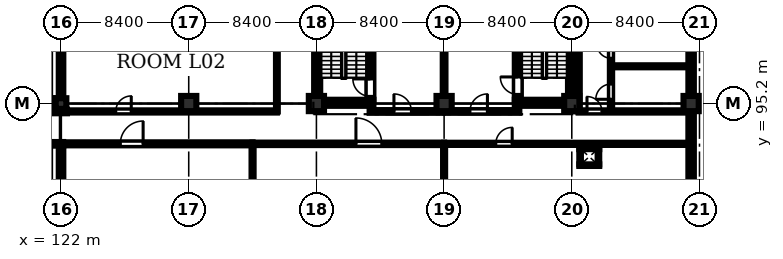
"""IFC4 building model, lengths in metres.
Left out: names, types, materials, properties, quantities, classifications, styles, units other than length and angle.
Written with IfcOpenShell. Run it as: python <this file> out.ifc"""

import sys

from ifc_helpers import new_model, si_unit, direction, frame, frame_2d, origin, origin_2d, place, context, subcontext, project, spatial, rectangle, extrude, element, fill, save


model = new_model("IFC4")
c1 = context("Model", 3, precision=1e-05, world=origin(), true_north=direction((0.0, 1.0)))
c2 = subcontext(c1, "Body", "Model", "MODEL_VIEW")
j1 = project(units=[si_unit("LENGTHUNIT", "METRE"), si_unit("PLANEANGLEUNIT", "RADIAN")], contexts=[c1])
p1 = place(None, origin())
s1 = spatial("IfcSite", under=j1, at=p1, CompositionType="ELEMENT")
p2 = place(p1, origin())
s2 = spatial("IfcBuilding", under=s1, at=p2, CompositionType="ELEMENT")
p3 = place(p2, frame((0.0, 0.0, 5.4)))
s3 = spatial("IfcBuildingStorey", under=s2, at=p3, CompositionType="ELEMENT", Elevation=5.4)
for number, where, z_axis, x_axis in (
    (1, (121.15, 95.2, 0.0), (0.0, 0.0, 1.0), (1.0, 0.0, 0.0)),
    (2, (122.0, 95.2, 0.0), (0.0, 0.0, 1.0), (1.0, 0.0, 0.0)),
):
    element("IfcColumn", number, at=place(p3, frame(where, z_axis=z_axis, x_axis=x_axis)), inside=s3, PredefinedType="COLUMN", context=c2, shape_type="SweptSolid", body=[
        extrude(rectangle(XDim=0.7, YDim=0.7, at=origin_2d()), origin(), (0.0, 0.0, 1.0), 4.58),
    ])
for number, where, z_axis, x_axis in (
    (3, (130.4, 95.2, 0.0), (0.0, 0.0, 1.0), (1.0, 0.0, 0.0)),
    (4, (138.8, 95.2, 0.0), (0.0, 0.0, 1.0), (1.0, 0.0, 0.0)),
    (5, (147.2, 95.2, 0.0), (0.0, 0.0, 1.0), (1.0, 0.0, 0.0)),
    (6, (155.6, 95.2, 0.0), (0.0, 0.0, 1.0), (1.0, 0.0, 0.0)),
    (7, (163.45, 95.2, 0.0), (0.0, 0.0, 1.0), (1.0, 0.0, 0.0)),
):
    element("IfcColumn", number, at=place(p3, frame(where, z_axis=z_axis, x_axis=x_axis)), inside=s3, PredefinedType="COLUMN", context=c2, shape_type="SweptSolid", body=[
        extrude(rectangle(XDim=1.0, YDim=1.0, at=origin_2d()), origin(), (0.0, 0.0, 1.0), 4.58),
    ])
p4 = place(p3, frame((138.65, 95.25, 0.0), z_axis=(0.0, 0.0, 1.0), x_axis=(1.0, 0.0, 0.0)))
e8 = element("IfcWall", 8, at=p4, inside=s3, PredefinedType="SHEAR", context=c2, shape_type="SweptSolid", body=[
    extrude(rectangle(XDim=3.9, YDim=0.4, at=frame_2d((1.95, 0.0))), origin(), (0.0, 0.0, 1.0), 4.58),
])
p5 = place(p3, frame((138.85, 95.45, 0.0), z_axis=(0.0, 0.0, 1.0), x_axis=(0.0, 1.0, 0.0)))
e9 = element("IfcWall", 9, at=p5, inside=s3, PredefinedType="SHEAR", context=c2, shape_type="SweptSolid", body=[
    extrude(rectangle(XDim=7.9, YDim=0.4, at=frame_2d((3.95, 0.0))), origin(), (0.0, 0.0, 1.0), 4.58),
])
p6 = place(p3, frame((142.35, 95.45, 0.0), z_axis=(0.0, 0.0, 1.0), x_axis=(0.0, 1.0, 0.0)))
e10 = element("IfcWall", 10, at=p6, inside=s3, PredefinedType="SHEAR", context=c2, shape_type="SweptSolid", body=[
    extrude(rectangle(XDim=7.9, YDim=0.4, at=frame_2d((3.95, 0.0))), origin(), (0.0, 0.0, 1.0), 4.58),
])
p7 = place(p6, frame((0.22, 0.0, 0.0)))
e11 = element("IfcOpeningElement", 11, at=p7, cuts=e10, PredefinedType="OPENING", context=c2, shape_type="SweptSolid", body=[
    extrude(rectangle(XDim=1.15, YDim=2.15, at=frame_2d((0.575, 1.075))), frame((0.0, 0.21, 0.0), z_axis=(0.0, -1.0, 0.0), x_axis=(1.0, 0.0, 0.0)), (0.0, 0.0, 1.0), 0.42),
])
p8 = place(p3, frame((151.85, 95.25, 0.0), z_axis=(0.0, 0.0, 1.0), x_axis=(1.0, 0.0, 0.0)))
e12 = element("IfcWall", 12, at=p8, inside=s3, PredefinedType="SHEAR", context=c2, shape_type="SweptSolid", body=[
    extrude(rectangle(XDim=3.9, YDim=0.4, at=frame_2d((1.95, 0.0))), origin(), (0.0, 0.0, 1.0), 4.58),
])
p9 = place(p3, frame((152.05, 95.45, 0.0), z_axis=(0.0, 0.0, 1.0), x_axis=(0.0, 1.0, 0.0)))
e13 = element("IfcWall", 13, at=p9, inside=s3, PredefinedType="SHEAR", context=c2, shape_type="SweptSolid", body=[
    extrude(rectangle(XDim=7.9, YDim=0.4, at=frame_2d((3.95, 0.0))), origin(), (0.0, 0.0, 1.0), 4.58),
])
p10 = place(p9, frame((0.35, 0.0, 0.0)))
e14 = element("IfcOpeningElement", 14, at=p10, cuts=e13, PredefinedType="OPENING", context=c2, shape_type="SweptSolid", body=[
    extrude(rectangle(XDim=1.15, YDim=2.15, at=frame_2d((0.575, 1.075))), frame((0.0, 0.21, 0.0), z_axis=(0.0, -1.0, 0.0), x_axis=(1.0, 0.0, 0.0)), (0.0, 0.0, 1.0), 0.42),
])
p11 = place(p3, frame((155.55, 95.45, 0.0), z_axis=(0.0, 0.0, 1.0), x_axis=(0.0, 1.0, 0.0)))
e15 = element("IfcWall", 15, at=p11, inside=s3, PredefinedType="SHEAR", context=c2, shape_type="SweptSolid", body=[
    extrude(rectangle(XDim=7.9, YDim=0.4, at=frame_2d((3.95, 0.0))), origin(), (0.0, 0.0, 1.0), 4.58),
])
p12 = place(p3, frame((163.45, 94.7, 0.0), z_axis=(0.0, 0.0, 1.0), x_axis=(0.0, -1.0, 0.0)))
e16 = element("IfcWall", 16, at=p12, inside=s3, PredefinedType="STANDARD", context=c2, shape_type="SweptSolid", body=[
    extrude(rectangle(XDim=7.4, YDim=0.36, at=frame_2d((3.7, 0.0))), origin(), (0.0, 0.0, 1.0), 3.83),
])
p13 = place(p12, frame((4.2, 0.0, 1.1)))
e17 = element("IfcOpeningElement", 17, at=p13, cuts=e16, PredefinedType="OPENING", context=c2, shape_type="SweptSolid", body=[
    extrude(rectangle(XDim=1.8, YDim=1.8, at=frame_2d((0.9, 0.9))), frame((0.0, 0.19, 0.0), z_axis=(0.0, -1.0, 0.0), x_axis=(1.0, 0.0, 0.0)), (0.0, 0.0, 1.0), 0.38),
])
p14 = place(p3, frame((163.45, 103.1, 0.0), z_axis=(0.0, 0.0, 1.0), x_axis=(0.0, -1.0, 0.0)))
e18 = element("IfcWall", 18, at=p14, inside=s3, PredefinedType="STANDARD", context=c2, shape_type="SweptSolid", body=[
    extrude(rectangle(XDim=7.4, YDim=0.36, at=frame_2d((3.7, 0.0))), origin(), (0.0, 0.0, 1.0), 3.83),
])
p15 = place(p14, frame((1.15, 0.0, 1.1)))
e19 = element("IfcOpeningElement", 19, at=p15, cuts=e18, PredefinedType="OPENING", context=c2, shape_type="SweptSolid", body=[
    extrude(rectangle(XDim=1.4, YDim=1.4, at=frame_2d((0.7, 0.7))), frame((0.0, 0.19, 0.0), z_axis=(0.0, -1.0, 0.0), x_axis=(1.0, 0.0, 0.0)), (0.0, 0.0, 1.0), 0.38),
])
p16 = place(p3, frame((122.0, 87.15, 0.0), z_axis=(0.0, 0.0, 1.0), x_axis=(0.0, 1.0, 0.0)))
e20 = element("IfcWall", 20, at=p16, inside=s3, PredefinedType="STANDARD", context=c2, shape_type="SweptSolid", body=[
    extrude(rectangle(XDim=5.27, YDim=0.3, at=frame_2d((2.635, 0.0))), origin(), (0.0, 0.0, 1.0), 3.83),
])
p17 = place(p3, frame((122.14, 92.55, 0.0), z_axis=(0.0, 0.0, 1.0), x_axis=(-1.0, 0.0, 0.0)))
e21 = element("IfcWall", 21, at=p17, inside=s3, PredefinedType="STANDARD", context=c2, shape_type="SweptSolid", body=[
    extrude(rectangle(XDim=1.11, YDim=0.24, at=frame_2d((0.555, 0.0))), origin(), (0.0, 0.0, 1.0), 4.58),
])
p18 = place(p3, frame((121.03, 94.68, 0.0), z_axis=(0.0, 0.0, 1.0), x_axis=(1.0, 0.0, 0.0)))
e22 = element("IfcWall", 22, at=p18, inside=s3, PredefinedType="STANDARD", context=c2, shape_type="SweptSolid", body=[
    extrude(rectangle(XDim=1.36, YDim=0.24, at=frame_2d((0.68, 0.0))), origin(), (0.0, 0.0, 1.0), 4.58),
])
p19 = place(p3, frame((122.0, 95.55, 0.0), z_axis=(0.0, 0.0, 1.0), x_axis=(0.0, 1.0, 0.0)))
e23 = element("IfcWall", 23, at=p19, inside=s3, PredefinedType="STANDARD", context=c2, shape_type="SweptSolid", body=[
    extrude(rectangle(XDim=7.7, YDim=0.3, at=frame_2d((3.85, 0.0))), origin(), (0.0, 0.0, 1.0), 3.83),
])
p20 = place(p3, frame((142.3, 94.68, 0.0), z_axis=(0.0, 0.0, 1.0), x_axis=(1.0, 0.0, 0.0)))
e24 = element("IfcWall", 24, at=p20, inside=s3, PredefinedType="STANDARD", context=c2, shape_type="SweptSolid", body=[
    extrude(rectangle(XDim=4.8, YDim=0.18, at=frame_2d((2.4, 0.0))), origin(), (0.0, 0.0, 1.0), 4.58),
])
p21 = place(p20, frame((1.6, 0.0, 0.0)))
e25 = element("IfcOpeningElement", 25, at=p21, cuts=e24, PredefinedType="OPENING", context=c2, shape_type="SweptSolid", body=[
    extrude(rectangle(XDim=1.15, YDim=2.15, at=frame_2d((0.575, 1.075))), frame((0.0, 0.1, 0.0), z_axis=(0.0, -1.0, 0.0), x_axis=(1.0, 0.0, 0.0)), (0.0, 0.0, 1.0), 0.2),
])
p22 = place(p3, frame((147.3, 94.68, 0.0), z_axis=(0.0, 0.0, 1.0), x_axis=(1.0, 0.0, 0.0)))
e26 = element("IfcWall", 26, at=p22, inside=s3, PredefinedType="STANDARD", context=c2, shape_type="SweptSolid", body=[
    extrude(rectangle(XDim=4.85, YDim=0.18, at=frame_2d((2.425, 0.0))), origin(), (0.0, 0.0, 1.0), 4.58),
])
p23 = place(p22, frame((1.6, 0.0, 0.0)))
e27 = element("IfcOpeningElement", 27, at=p23, cuts=e26, PredefinedType="OPENING", context=c2, shape_type="SweptSolid", body=[
    extrude(rectangle(XDim=1.15, YDim=2.15, at=frame_2d((0.575, 1.075))), frame((0.0, 0.1, 0.0), z_axis=(0.0, -1.0, 0.0), x_axis=(1.0, 0.0, 0.0)), (0.0, 0.0, 1.0), 0.2),
])
p24 = place(p3, frame((147.2, 95.75, 0.0), z_axis=(0.0, 0.0, 1.0), x_axis=(0.0, 1.0, 0.0)))
e28 = element("IfcWall", 28, at=p24, inside=s3, PredefinedType="STANDARD", context=c2, shape_type="SweptSolid", body=[
    extrude(rectangle(XDim=4.5, YDim=0.18, at=frame_2d((2.25, 0.0))), origin(), (0.0, 0.0, 1.0), 3.83),
])
p25 = place(p3, frame((156.05, 94.68, 0.0), z_axis=(0.0, 0.0, 1.0), x_axis=(1.0, 0.0, 0.0)))
e29 = element("IfcWall", 29, at=p25, inside=s3, PredefinedType="PARTITIONING", context=c2, shape_type="SweptSolid", body=[
    extrude(rectangle(XDim=7.15, YDim=0.15, at=frame_2d((3.575, 0.0))), origin(), (0.0, 0.0, 1.0), 4.58),
])
p26 = place(p25, frame((0.55, 0.0, 0.0)))
e30 = element("IfcOpeningElement", 30, at=p26, cuts=e29, PredefinedType="OPENING", context=c2, shape_type="SweptSolid", body=[
    extrude(rectangle(XDim=0.98, YDim=2.12, at=frame_2d((0.49, 1.06))), frame((0.0, 0.085, 0.0), z_axis=(0.0, -1.0, 0.0), x_axis=(1.0, 0.0, 0.0)), (0.0, 0.0, 1.0), 0.17),
])
p27 = place(p3, frame((158.18, 94.68, 0.0), z_axis=(0.0, 0.0, 1.0), x_axis=(0.0, 1.0, 0.0)))
e31 = element("IfcWall", 31, at=p27, inside=s3, PredefinedType="PARTITIONING", context=c2, shape_type="SweptSolid", body=[
    extrude(rectangle(XDim=8.57, YDim=0.15, at=frame_2d((4.285, 0.0))), origin(), (0.0, 0.0, 1.0), 4.58),
])
p28 = place(p27, frame((0.8, 0.0, 0.0)))
e32 = element("IfcOpeningElement", 32, at=p28, cuts=e31, PredefinedType="OPENING", context=c2, shape_type="SweptSolid", body=[
    extrude(rectangle(XDim=1.0, YDim=2.12, at=frame_2d((0.5, 1.06))), frame((0.0, 0.085, 0.0), z_axis=(0.0, -1.0, 0.0), x_axis=(1.0, 0.0, 0.0)), (0.0, 0.0, 1.0), 0.17),
])
p29 = place(p27, frame((3.5, 0.0, 0.0)))
e33 = element("IfcOpeningElement", 33, at=p29, cuts=e31, PredefinedType="OPENING", context=c2, shape_type="SweptSolid", body=[
    extrude(rectangle(XDim=0.92, YDim=2.1, at=frame_2d((0.46, 1.05))), frame((0.0, 0.085, 0.0), z_axis=(0.0, -1.0, 0.0), x_axis=(1.0, 0.0, 0.0)), (0.0, 0.0, 1.0), 0.17),
])
p30 = place(p27, frame((6.4, 0.0, 0.0)))
e34 = element("IfcOpeningElement", 34, at=p30, cuts=e31, PredefinedType="OPENING", context=c2, shape_type="SweptSolid", body=[
    extrude(rectangle(XDim=0.92, YDim=2.1, at=frame_2d((0.46, 1.05))), frame((0.0, 0.085, 0.0), z_axis=(0.0, -1.0, 0.0), x_axis=(1.0, 0.0, 0.0)), (0.0, 0.0, 1.0), 0.17),
])
p31 = place(p3, frame((158.18, 97.65, 0.0), z_axis=(0.0, 0.0, 1.0), x_axis=(1.0, 0.0, 0.0)))
e35 = element("IfcWall", 35, at=p31, inside=s3, PredefinedType="PARTITIONING", context=c2, shape_type="SweptSolid", body=[
    extrude(rectangle(XDim=5.02, YDim=0.135, at=frame_2d((2.51, 0.0))), origin(), (0.0, 0.0, 1.0), 4.58),
])
p32 = place(p3, frame((156.05, 94.68, 0.0), z_axis=(0.0, 0.0, 1.0), x_axis=(0.0, 1.0, 0.0)))
e36 = element("IfcWall", 36, at=p32, inside=s3, PredefinedType="PARTITIONING", context=c2, shape_type="SweptSolid", body=[
    extrude(rectangle(XDim=8.57, YDim=0.15, at=frame_2d((4.285, 0.0))), origin(), (0.0, 0.0, 1.0), 4.58),
])
p33 = place(p3, frame((136.2, 94.68, 0.0), z_axis=(0.0, 0.0, 1.0), x_axis=(0.0, 1.0, 0.0)))
e37 = element("IfcWall", 37, at=p33, inside=s3, PredefinedType="PARTITIONING", context=c2, shape_type="SweptSolid", body=[
    extrude(rectangle(XDim=9.07, YDim=0.12, at=frame_2d((4.535, 0.0))), origin(), (0.0, 0.0, 1.0), 4.58),
])
p34 = place(p3, frame((122.4, 94.68, 0.0), z_axis=(0.0, 0.0, 1.0), x_axis=(1.0, 0.0, 0.0)))
e38 = element("IfcWall", 38, at=p34, inside=s3, PredefinedType="PARTITIONING", context=c2, shape_type="SweptSolid", body=[
    extrude(rectangle(XDim=13.8, YDim=0.145, at=frame_2d((6.9, 0.0))), origin(), (0.0, 0.0, 1.0), 4.58),
])
p35 = place(p34, frame((3.2, 0.0, 0.0)))
e39 = element("IfcOpeningElement", 39, at=p35, cuts=e38, PredefinedType="OPENING", context=c2, shape_type="SweptSolid", body=[
    extrude(rectangle(XDim=1.02, YDim=2.15, at=frame_2d((0.51, 1.075))), frame((0.0, 0.083, 0.0), z_axis=(0.0, -1.0, 0.0), x_axis=(1.0, 0.0, 0.0)), (0.0, 0.0, 1.0), 0.165),
])
p36 = place(p3, frame((122.15, 92.55, 0.0), z_axis=(0.0, 0.0, 1.0), x_axis=(1.0, 0.0, 0.0)))
e40 = element("IfcWall", 40, at=p36, inside=s3, PredefinedType="SOLIDWALL", context=c2, shape_type="SweptSolid", body=[
    extrude(rectangle(XDim=12.45, YDim=0.2, at=frame_2d((6.225, 0.0))), origin(), (0.0, 0.0, 1.0), 4.58),
])
p37 = place(p36, frame((3.75, 0.0, 0.0)))
e41 = element("IfcOpeningElement", 41, at=p37, cuts=e40, PredefinedType="OPENING", context=c2, shape_type="SweptSolid", body=[
    extrude(rectangle(XDim=1.5, YDim=2.2, at=frame_2d((0.75, 1.1))), frame((0.0, 0.11, 0.0), z_axis=(0.0, -1.0, 0.0), x_axis=(1.0, 0.0, 0.0)), (0.0, 0.0, 1.0), 0.22),
])
p38 = place(p3, frame((134.6, 92.55, 0.0), z_axis=(0.0, 0.0, 1.0), x_axis=(1.0, 0.0, 0.0)))
e42 = element("IfcWall", 42, at=p38, inside=s3, PredefinedType="PARTITIONING", context=c2, shape_type="SweptSolid", body=[
    extrude(rectangle(XDim=12.6, YDim=0.165, at=frame_2d((6.3, 0.0))), origin(), (0.0, 0.0, 1.0), 4.58),
])
p39 = place(p38, frame((6.8, 0.0, 0.0)))
e43 = element("IfcOpeningElement", 43, at=p39, cuts=e42, PredefinedType="OPENING", context=c2, shape_type="SweptSolid", body=[
    extrude(rectangle(XDim=1.7, YDim=2.2, at=frame_2d((0.85, 1.1))), frame((0.0, 0.093, 0.0), z_axis=(0.0, -1.0, 0.0), x_axis=(1.0, 0.0, 0.0)), (0.0, 0.0, 1.0), 0.185),
])
p40 = place(p3, frame((134.6, 78.55, 0.0), z_axis=(0.0, 0.0, 1.0), x_axis=(0.0, 1.0, 0.0)))
e44 = element("IfcWall", 44, at=p40, inside=s3, PredefinedType="PARTITIONING", context=c2, shape_type="SweptSolid", body=[
    extrude(rectangle(XDim=14.0, YDim=0.135, at=frame_2d((7.0, 0.0))), origin(), (0.0, 0.0, 1.0), 4.03),
])
p41 = place(p3, frame((147.2, 92.55, 0.0), z_axis=(0.0, 0.0, 1.0), x_axis=(1.0, 0.0, 0.0)))
e45 = element("IfcWall", 45, at=p41, inside=s3, PredefinedType="PARTITIONING", context=c2, shape_type="SweptSolid", body=[
    extrude(rectangle(XDim=16.15, YDim=0.145, at=frame_2d((8.075, 0.0))), origin(), (0.0, 0.0, 1.0), 4.58),
])
p42 = place(p41, frame((3.4, 0.0, 0.0)))
e46 = element("IfcOpeningElement", 46, at=p42, cuts=e45, PredefinedType="OPENING", context=c2, shape_type="SweptSolid", body=[
    extrude(rectangle(XDim=1.08, YDim=2.15, at=frame_2d((0.54, 1.075))), frame((0.0, 0.083, 0.0), z_axis=(0.0, -1.0, 0.0), x_axis=(1.0, 0.0, 0.0)), (0.0, 0.0, 1.0), 0.165),
])
p43 = place(p3, frame((147.2, 78.55, 0.0), z_axis=(0.0, 0.0, 1.0), x_axis=(0.0, 1.0, 0.0)))
e47 = element("IfcWall", 47, at=p43, inside=s3, PredefinedType="PARTITIONING", context=c2, shape_type="SweptSolid", body=[
    extrude(rectangle(XDim=14.0, YDim=0.135, at=frame_2d((7.0, 0.0))), origin(), (0.0, 0.0, 1.0), 3.83),
])
for number, where, z_axis, x_axis in (
    (48, (156.095, 91.147, 0.0), (0.0, 0.0, 1.0), (1.0, 0.0, 0.0)),
    (49, (156.095, 92.252, 0.0), (0.0, 0.0, 1.0), (1.0, 0.0, 0.0)),
):
    element("IfcWall", number, at=place(p3, frame(where, z_axis=z_axis, x_axis=x_axis)), inside=s3, PredefinedType="PARTITIONING", context=c2, shape_type="SweptSolid", body=[
        extrude(rectangle(XDim=1.31, YDim=0.105, at=frame_2d((0.655, 0.0))), origin(), (0.0, 0.0, 1.0), 4.58),
    ])
for number, where, z_axis, x_axis in (
    (50, (156.147, 91.2, 0.0), (0.0, 0.0, 1.0), (0.0, 1.0, 0.0)),
    (51, (157.353, 91.2, 0.0), (0.0, 0.0, 1.0), (0.0, 1.0, 0.0)),
):
    element("IfcWall", number, at=place(p3, frame(where, z_axis=z_axis, x_axis=x_axis)), inside=s3, PredefinedType="PARTITIONING", context=c2, shape_type="SweptSolid", body=[
        extrude(rectangle(XDim=1.0, YDim=0.105, at=frame_2d((0.5, 0.0))), origin(), (0.0, 0.0, 1.0), 4.58),
    ])
p44 = place(p13, origin())
e52 = element("IfcWindow", 52, at=p44, inside=s3, PartitioningType="DOUBLE_PANEL_VERTICAL", PredefinedType="WINDOW", context=c2, shape_type="SweptSolid", body=[
    extrude(rectangle(XDim=1.8, YDim=1.8, at=frame_2d((0.9, 0.9))), frame((0.0, 0.03, 0.0), z_axis=(0.0, -1.0, 0.0), x_axis=(1.0, 0.0, 0.0)), (0.0, 0.0, 1.0), 0.06),
])
fill(e17, e52)
p45 = place(p21, origin())
e53 = element("IfcDoor", 53, at=p45, inside=s3, OperationType="SINGLE_SWING_LEFT", PredefinedType="DOOR", context=c2, shape_type="SweptSolid", body=[
    extrude(rectangle(XDim=1.15, YDim=2.15, at=frame_2d((0.575, 1.075))), frame((0.0, 0.025, 0.0), z_axis=(0.0, -1.0, 0.0), x_axis=(1.0, 0.0, 0.0)), (0.0, 0.0, 1.0), 0.05),
])
fill(e25, e53)
p46 = place(p23, origin())
e54 = element("IfcDoor", 54, at=p46, inside=s3, OperationType="SINGLE_SWING_RIGHT", PredefinedType="DOOR", context=c2, shape_type="SweptSolid", body=[
    extrude(rectangle(XDim=1.15, YDim=2.15, at=frame_2d((0.575, 1.075))), frame((0.0, 0.025, 0.0), z_axis=(0.0, -1.0, 0.0), x_axis=(1.0, 0.0, 0.0)), (0.0, 0.0, 1.0), 0.05),
])
fill(e27, e54)
p47 = place(p26, origin())
e55 = element("IfcDoor", 55, at=p47, inside=s3, OperationType="SINGLE_SWING_LEFT", PredefinedType="DOOR", context=c2, shape_type="SweptSolid", body=[
    extrude(rectangle(XDim=0.98, YDim=2.12, at=frame_2d((0.49, 1.06))), frame((0.0, 0.025, 0.0), z_axis=(0.0, -1.0, 0.0), x_axis=(1.0, 0.0, 0.0)), (0.0, 0.0, 1.0), 0.05),
])
fill(e30, e55)
p48 = place(p28, origin())
e56 = element("IfcDoor", 56, at=p48, inside=s3, OperationType="SINGLE_SWING_LEFT", PredefinedType="DOOR", context=c2, shape_type="SweptSolid", body=[
    extrude(rectangle(XDim=1.0, YDim=2.12, at=frame_2d((0.5, 1.06))), frame((0.0, 0.025, 0.0), z_axis=(0.0, -1.0, 0.0), x_axis=(1.0, 0.0, 0.0)), (0.0, 0.0, 1.0), 0.05),
])
fill(e32, e56)
p49 = place(p29, origin())
e57 = element("IfcDoor", 57, at=p49, inside=s3, OperationType="SINGLE_SWING_RIGHT", PredefinedType="DOOR", context=c2, shape_type="SweptSolid", body=[
    extrude(rectangle(XDim=0.92, YDim=2.1, at=frame_2d((0.46, 1.05))), frame((0.0, 0.025, 0.0), z_axis=(0.0, -1.0, 0.0), x_axis=(1.0, 0.0, 0.0)), (0.0, 0.0, 1.0), 0.05),
])
fill(e33, e57)
p50 = place(p35, origin())
e58 = element("IfcDoor", 58, at=p50, inside=s3, OperationType="SINGLE_SWING_RIGHT", PredefinedType="DOOR", context=c2, shape_type="SweptSolid", body=[
    extrude(rectangle(XDim=1.02, YDim=2.15, at=frame_2d((0.51, 1.075))), frame((0.0, 0.025, 0.0), z_axis=(0.0, -1.0, 0.0), x_axis=(1.0, 0.0, 0.0)), (0.0, 0.0, 1.0), 0.05),
])
fill(e39, e58)
p51 = place(p37, origin())
e59 = element("IfcDoor", 59, at=p51, inside=s3, OperationType="SINGLE_SWING_RIGHT", PredefinedType="DOOR", context=c2, shape_type="SweptSolid", body=[
    extrude(rectangle(XDim=1.5, YDim=2.2, at=frame_2d((0.75, 1.1))), frame((0.0, 0.025, 0.0), z_axis=(0.0, -1.0, 0.0), x_axis=(1.0, 0.0, 0.0)), (0.0, 0.0, 1.0), 0.05),
])
fill(e41, e59)
p52 = place(p39, origin())
e60 = element("IfcDoor", 60, at=p52, inside=s3, OperationType="SINGLE_SWING_LEFT", PredefinedType="DOOR", context=c2, shape_type="SweptSolid", body=[
    extrude(rectangle(XDim=1.7, YDim=2.2, at=frame_2d((0.85, 1.1))), frame((0.0, 0.025, 0.0), z_axis=(0.0, -1.0, 0.0), x_axis=(1.0, 0.0, 0.0)), (0.0, 0.0, 1.0), 0.05),
])
fill(e43, e60)
p53 = place(p42, origin())
e61 = element("IfcDoor", 61, at=p53, inside=s3, OperationType="SINGLE_SWING_RIGHT", PredefinedType="DOOR", context=c2, shape_type="SweptSolid", body=[
    extrude(rectangle(XDim=1.08, YDim=2.15, at=frame_2d((0.54, 1.075))), frame((0.0, 0.025, 0.0), z_axis=(0.0, -1.0, 0.0), x_axis=(1.0, 0.0, 0.0)), (0.0, 0.0, 1.0), 0.05),
])
fill(e46, e61)
p54 = place(p7, origin())
e62 = element("IfcDoor", 62, at=p54, inside=s3, OperationType="SINGLE_SWING_RIGHT", PredefinedType="DOOR", context=c2, shape_type="SweptSolid", body=[
    extrude(rectangle(XDim=1.15, YDim=2.15, at=frame_2d((0.575, 1.075))), frame((0.0, 0.025, 0.0), z_axis=(0.0, -1.0, 0.0), x_axis=(1.0, 0.0, 0.0)), (0.0, 0.0, 1.0), 0.05),
])
fill(e11, e62)
p55 = place(p10, origin())
e63 = element("IfcDoor", 63, at=p55, inside=s3, OperationType="SINGLE_SWING_RIGHT", PredefinedType="DOOR", context=c2, shape_type="SweptSolid", body=[
    extrude(rectangle(XDim=1.15, YDim=2.15, at=frame_2d((0.575, 1.075))), frame((0.0, 0.025, 0.0), z_axis=(0.0, -1.0, 0.0), x_axis=(1.0, 0.0, 0.0)), (0.0, 0.0, 1.0), 0.05),
])
fill(e14, e63)
save(model, sys.argv[1])
